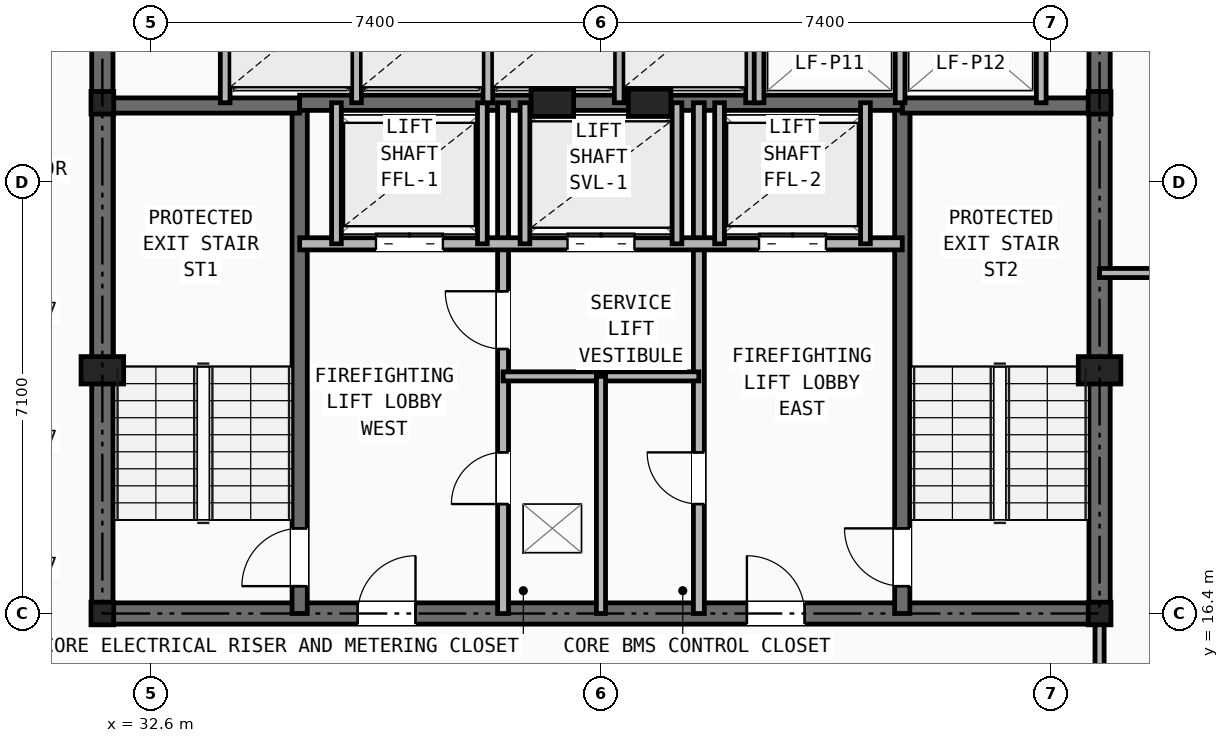
"""IFC4 building model, lengths in metres.
Left out: names, types, materials, properties, quantities, classifications, styles, units other than length and angle.
Written with IfcOpenShell. Run it as: python <this file> out.ifc"""

import sys

from ifc_helpers import new_model, si_unit, direction, frame, frame_2d, origin, origin_2d, place, context, subcontext, project, spatial, rectangle, i_section, extrude, element, fill, save


model = new_model("IFC4")
c1 = context("Model", 3, precision=1e-05, world=origin(), true_north=direction((0.0, 1.0)))
c2 = subcontext(c1, "Body", "Model", "MODEL_VIEW")
j1 = project(units=[si_unit("LENGTHUNIT", "METRE"), si_unit("PLANEANGLEUNIT", "RADIAN")], contexts=[c1])
p1 = place(None, origin())
s1 = spatial("IfcSite", under=j1, at=p1, CompositionType="ELEMENT")
p2 = place(p1, origin())
s2 = spatial("IfcBuilding", under=s1, at=p2, CompositionType="ELEMENT")
p3 = place(p2, frame((0.0, 0.0, 122.9)))
s3 = spatial("IfcBuildingStorey", under=s2, at=p3, CompositionType="ELEMENT", Elevation=122.9)
for number, where, z_axis, x_axis in (
    (1, (31.8, 16.4, 0.0), (0.0, 0.0, 1.0), (1.0, 0.0, 0.0)),
    (2, (48.2, 16.4, 0.0), (0.0, 0.0, 1.0), (1.0, 0.0, 0.0)),
    (3, (31.8, 24.8, 0.0), (0.0, 0.0, 1.0), (1.0, 0.0, 0.0)),
    (4, (48.2, 24.8, 0.0), (0.0, 0.0, 1.0), (1.0, 0.0, 0.0)),
):
    element("IfcColumn", number, at=place(p3, frame(where, z_axis=z_axis, x_axis=x_axis)), inside=s3, PredefinedType="COLUMN", context=c2, shape_type="SweptSolid", body=[
        extrude(i_section(OverallWidth=0.374, OverallDepth=0.372, WebThickness=0.016, FlangeThickness=0.026, at=origin_2d()), origin(), (0.0, 0.0, 1.0), 3.45),
    ])
for number, where, z_axis, x_axis in (
    (5, (31.8, 20.4, 0.0), (0.0, 0.0, 1.0), (1.0, 0.0, 0.0)),
    (6, (48.2, 20.4, 0.0), (0.0, 0.0, 1.0), (1.0, 0.0, 0.0)),
    (7, (39.2, 24.8, 0.0), (0.0, 0.0, 1.0), (1.0, 0.0, 0.0)),
    (8, (40.8, 24.8, 0.0), (0.0, 0.0, 1.0), (1.0, 0.0, 0.0)),
):
    element("IfcColumn", number, at=place(p3, frame(where, z_axis=z_axis, x_axis=x_axis)), inside=s3, PredefinedType="PILASTER", context=c2, shape_type="SweptSolid", body=[
        extrude(rectangle(XDim=0.7, YDim=0.45, at=origin_2d()), origin(), (0.0, 0.0, 1.0), 3.45),
    ])
p4 = place(p3, frame((31.8, 16.4, 0.0), z_axis=(0.0, 0.0, 1.0), x_axis=(1.0, 0.0, 0.0)))
e9 = element("IfcWall", 9, at=p4, inside=s3, PredefinedType="SHEAR", context=c2, shape_type="SweptSolid", body=[
    extrude(rectangle(XDim=16.4, YDim=0.35, at=frame_2d((8.2, 0.0))), origin(), (0.0, 0.0, 1.0), 3.21),
])
p5 = place(p4, frame((4.2, 0.0, 0.0)))
e10 = element("IfcOpeningElement", 10, at=p5, cuts=e9, PredefinedType="OPENING", context=c2, shape_type="SweptSolid", body=[
    extrude(rectangle(XDim=0.95, YDim=2.1, at=frame_2d((0.475, 1.05))), frame((0.0, 0.185, 0.0), z_axis=(0.0, -1.0, 0.0), x_axis=(1.0, 0.0, 0.0)), (0.0, 0.0, 1.0), 0.37),
])
p6 = place(p4, frame((10.6, 0.0, 0.0)))
e11 = element("IfcOpeningElement", 11, at=p6, cuts=e9, PredefinedType="OPENING", context=c2, shape_type="SweptSolid", body=[
    extrude(rectangle(XDim=0.95, YDim=2.1, at=frame_2d((0.475, 1.05))), frame((0.0, 0.185, 0.0), z_axis=(0.0, -1.0, 0.0), x_axis=(1.0, 0.0, 0.0)), (0.0, 0.0, 1.0), 0.37),
])
p7 = place(p3, frame((31.8, 16.4, 0.0), z_axis=(0.0, 0.0, 1.0), x_axis=(0.0, 1.0, 0.0)))
e12 = element("IfcWall", 12, at=p7, inside=s3, PredefinedType="SHEAR", context=c2, shape_type="SweptSolid", body=[
    extrude(rectangle(XDim=14.8, YDim=0.35, at=frame_2d((7.4, 0.0))), origin(), (0.0, 0.0, 1.0), 3.21),
])
p8 = place(p7, frame((11.0, 0.0, 0.0)))
e13 = element("IfcOpeningElement", 13, at=p8, cuts=e12, PredefinedType="OPENING", context=c2, shape_type="SweptSolid", body=[
    extrude(rectangle(XDim=1.1, YDim=2.15, at=frame_2d((0.55, 1.075))), frame((0.0, 0.185, 0.0), z_axis=(0.0, -1.0, 0.0), x_axis=(1.0, 0.0, 0.0)), (0.0, 0.0, 1.0), 0.37),
])
p9 = place(p3, frame((48.2, 16.4, 0.0), z_axis=(0.0, 0.0, 1.0), x_axis=(0.0, 1.0, 0.0)))
e14 = element("IfcWall", 14, at=p9, inside=s3, PredefinedType="SHEAR", context=c2, shape_type="SweptSolid", body=[
    extrude(rectangle(XDim=14.8, YDim=0.35, at=frame_2d((7.4, 0.0))), origin(), (0.0, 0.0, 1.0), 3.21),
])
p10 = place(p9, frame((11.0, 0.0, 0.0)))
e15 = element("IfcOpeningElement", 15, at=p10, cuts=e14, PredefinedType="OPENING", context=c2, shape_type="SweptSolid", body=[
    extrude(rectangle(XDim=1.1, YDim=2.15, at=frame_2d((0.55, 1.075))), frame((0.0, 0.185, 0.0), z_axis=(0.0, -1.0, 0.0), x_axis=(1.0, 0.0, 0.0)), (0.0, 0.0, 1.0), 0.37),
])
p11 = place(p3, frame((35.045, 16.4, 0.0), z_axis=(0.0, 0.0, 1.0), x_axis=(0.0, 1.0, 0.0)))
e16 = element("IfcWall", 16, at=p11, inside=s3, PredefinedType="SHEAR", context=c2, shape_type="SweptSolid", body=[
    extrude(rectangle(XDim=8.4, YDim=0.25, at=frame_2d((4.2, 0.0))), origin(), (0.0, 0.0, 1.0), 3.21),
])
p12 = place(p11, frame((0.45, 0.0, 0.0)))
e17 = element("IfcOpeningElement", 17, at=p12, cuts=e16, PredefinedType="OPENING", context=c2, shape_type="SweptSolid", body=[
    extrude(rectangle(XDim=0.95, YDim=2.1, at=frame_2d((0.475, 1.05))), frame((0.0, 0.135, 0.0), z_axis=(0.0, -1.0, 0.0), x_axis=(1.0, 0.0, 0.0)), (0.0, 0.0, 1.0), 0.27),
])
p13 = place(p3, frame((31.8, 24.755, 0.0), z_axis=(0.0, 0.0, 1.0), x_axis=(1.0, 0.0, 0.0)))
e18 = element("IfcWall", 18, at=p13, inside=s3, PredefinedType="SHEAR", context=c2, shape_type="SweptSolid", body=[
    extrude(rectangle(XDim=3.245, YDim=0.25, at=frame_2d((1.623, 0.0))), origin(), (0.0, 0.0, 1.0), 3.21),
])
p14 = place(p3, frame((44.955, 16.4, 0.0), z_axis=(0.0, 0.0, 1.0), x_axis=(0.0, 1.0, 0.0)))
e19 = element("IfcWall", 19, at=p14, inside=s3, PredefinedType="SHEAR", context=c2, shape_type="SweptSolid", body=[
    extrude(rectangle(XDim=8.4, YDim=0.25, at=frame_2d((4.2, 0.0))), origin(), (0.0, 0.0, 1.0), 3.21),
])
p15 = place(p14, frame((0.45, 0.0, 0.0)))
e20 = element("IfcOpeningElement", 20, at=p15, cuts=e19, PredefinedType="OPENING", context=c2, shape_type="SweptSolid", body=[
    extrude(rectangle(XDim=0.95, YDim=2.1, at=frame_2d((0.475, 1.05))), frame((0.0, 0.135, 0.0), z_axis=(0.0, -1.0, 0.0), x_axis=(1.0, 0.0, 0.0)), (0.0, 0.0, 1.0), 0.27),
])
p16 = place(p3, frame((44.955, 24.755, 0.0), z_axis=(0.0, 0.0, 1.0), x_axis=(1.0, 0.0, 0.0)))
e21 = element("IfcWall", 21, at=p16, inside=s3, PredefinedType="SHEAR", context=c2, shape_type="SweptSolid", body=[
    extrude(rectangle(XDim=3.245, YDim=0.25, at=frame_2d((1.623, 0.0))), origin(), (0.0, 0.0, 1.0), 3.21),
])
p17 = place(p3, frame((35.045, 24.8, 0.0), z_axis=(0.0, 0.0, 1.0), x_axis=(1.0, 0.0, 0.0)))
e22 = element("IfcWall", 22, at=p17, inside=s3, PredefinedType="SHEAR", context=c2, shape_type="SweptSolid", body=[
    extrude(rectangle(XDim=9.91, YDim=0.25, at=frame_2d((4.955, 0.0))), origin(), (0.0, 0.0, 1.0), 3.21),
])
p18 = place(p3, frame((38.39, 16.4, 0.0), z_axis=(0.0, 0.0, 1.0), x_axis=(0.0, 1.0, 0.0)))
e23 = element("IfcWall", 23, at=p18, inside=s3, PredefinedType="PARTITIONING", context=c2, shape_type="SweptSolid", body=[
    extrude(rectangle(XDim=8.4, YDim=0.18, at=frame_2d((4.2, 0.0))), origin(), (0.0, 0.0, 1.0), 2.938),
])
p19 = place(p18, frame((1.8, 0.0, 0.0)))
e24 = element("IfcOpeningElement", 24, at=p19, cuts=e23, PredefinedType="OPENING", context=c2, shape_type="SweptSolid", body=[
    extrude(rectangle(XDim=0.85, YDim=2.05, at=frame_2d((0.425, 1.025))), frame((0.0, 0.1, 0.0), z_axis=(0.0, -1.0, 0.0), x_axis=(1.0, 0.0, 0.0)), (0.0, 0.0, 1.0), 0.2),
])
p20 = place(p18, frame((4.35, 0.0, 0.0)))
e25 = element("IfcOpeningElement", 25, at=p20, cuts=e23, PredefinedType="OPENING", context=c2, shape_type="SweptSolid", body=[
    extrude(rectangle(XDim=0.95, YDim=2.1, at=frame_2d((0.475, 1.05))), frame((0.0, 0.1, 0.0), z_axis=(0.0, -1.0, 0.0), x_axis=(1.0, 0.0, 0.0)), (0.0, 0.0, 1.0), 0.2),
])
p21 = place(p3, frame((41.61, 16.4, 0.0), z_axis=(0.0, 0.0, 1.0), x_axis=(0.0, 1.0, 0.0)))
e26 = element("IfcWall", 26, at=p21, inside=s3, PredefinedType="PARTITIONING", context=c2, shape_type="SweptSolid", body=[
    extrude(rectangle(XDim=8.4, YDim=0.18, at=frame_2d((4.2, 0.0))), origin(), (0.0, 0.0, 1.0), 2.938),
])
p22 = place(p21, frame((1.8, 0.0, 0.0)))
e27 = element("IfcOpeningElement", 27, at=p22, cuts=e26, PredefinedType="OPENING", context=c2, shape_type="SweptSolid", body=[
    extrude(rectangle(XDim=0.85, YDim=2.05, at=frame_2d((0.425, 1.025))), frame((0.0, 0.1, 0.0), z_axis=(0.0, -1.0, 0.0), x_axis=(1.0, 0.0, 0.0)), (0.0, 0.0, 1.0), 0.2),
])
p23 = place(p3, frame((35.045, 22.48, 0.0), z_axis=(0.0, 0.0, 1.0), x_axis=(1.0, 0.0, 0.0)))
e28 = element("IfcWall", 28, at=p23, inside=s3, PredefinedType="SOLIDWALL", context=c2, shape_type="SweptSolid", body=[
    extrude(rectangle(XDim=9.91, YDim=0.2, at=frame_2d((4.955, 0.0))), origin(), (0.0, 0.0, 1.0), 3.21),
])
p24 = place(p23, frame((1.255, 0.0, 0.0)))
e29 = element("IfcOpeningElement", 29, at=p24, cuts=e28, PredefinedType="OPENING", context=c2, shape_type="SweptSolid", body=[
    extrude(rectangle(XDim=1.1, YDim=2.15, at=frame_2d((0.55, 1.075))), frame((0.0, 0.11, 0.0), z_axis=(0.0, -1.0, 0.0), x_axis=(1.0, 0.0, 0.0)), (0.0, 0.0, 1.0), 0.22),
])
p25 = place(p23, frame((7.555, 0.0, 0.0)))
e30 = element("IfcOpeningElement", 30, at=p25, cuts=e28, PredefinedType="OPENING", context=c2, shape_type="SweptSolid", body=[
    extrude(rectangle(XDim=1.1, YDim=2.15, at=frame_2d((0.55, 1.075))), frame((0.0, 0.11, 0.0), z_axis=(0.0, -1.0, 0.0), x_axis=(1.0, 0.0, 0.0)), (0.0, 0.0, 1.0), 0.22),
])
p26 = place(p23, frame((4.405, 0.0, 0.0)))
e31 = element("IfcOpeningElement", 31, at=p26, cuts=e28, PredefinedType="OPENING", context=c2, shape_type="SweptSolid", body=[
    extrude(rectangle(XDim=1.1, YDim=2.15, at=frame_2d((0.55, 1.075))), frame((0.0, 0.11, 0.0), z_axis=(0.0, -1.0, 0.0), x_axis=(1.0, 0.0, 0.0)), (0.0, 0.0, 1.0), 0.22),
])
p27 = place(p3, frame((38.39, 20.3, 0.0), z_axis=(0.0, 0.0, 1.0), x_axis=(1.0, 0.0, 0.0)))
e32 = element("IfcWall", 32, at=p27, inside=s3, PredefinedType="PARTITIONING", context=c2, shape_type="SweptSolid", body=[
    extrude(rectangle(XDim=3.22, YDim=0.15, at=frame_2d((1.61, 0.0))), origin(), (0.0, 0.0, 1.0), 3.21),
])
p28 = place(p3, frame((40.0, 16.4, 0.0), z_axis=(0.0, 0.0, 1.0), x_axis=(0.0, 1.0, 0.0)))
e33 = element("IfcWall", 33, at=p28, inside=s3, PredefinedType="PARTITIONING", context=c2, shape_type="SweptSolid", body=[
    extrude(rectangle(XDim=3.9, YDim=0.15, at=frame_2d((1.95, 0.0))), origin(), (0.0, 0.0, 1.0), 2.938),
])
for number, where, z_axis, x_axis in (
    (34, (35.65, 22.48, 0.0), (0.0, 0.0, 1.0), (0.0, 1.0, 0.0)),
    (35, (38.05, 22.48, 0.0), (0.0, 0.0, 1.0), (0.0, 1.0, 0.0)),
    (36, (41.95, 22.48, 0.0), (0.0, 0.0, 1.0), (0.0, 1.0, 0.0)),
    (37, (44.35, 22.48, 0.0), (0.0, 0.0, 1.0), (0.0, 1.0, 0.0)),
    (38, (38.75, 22.48, 0.0), (0.0, 0.0, 1.0), (0.0, 1.0, 0.0)),
    (39, (41.25, 22.48, 0.0), (0.0, 0.0, 1.0), (0.0, 1.0, 0.0)),
):
    element("IfcWall", number, at=place(p3, frame(where, z_axis=z_axis, x_axis=x_axis)), inside=s3, PredefinedType="SOLIDWALL", context=c2, shape_type="SweptSolid", body=[
        extrude(rectangle(XDim=2.32, YDim=0.16, at=frame_2d((1.16, 0.0))), origin(), (0.0, 0.0, 1.0), 3.21),
    ])
for number, where, z_axis, x_axis in (
    (40, (33.82, 24.8, 0.0), (0.0, 0.0, 1.0), (0.0, 1.0, 0.0)),
    (41, (35.98, 24.8, 0.0), (0.0, 0.0, 1.0), (0.0, 1.0, 0.0)),
    (42, (38.14, 24.8, 0.0), (0.0, 0.0, 1.0), (0.0, 1.0, 0.0)),
    (43, (40.3, 24.8, 0.0), (0.0, 0.0, 1.0), (0.0, 1.0, 0.0)),
    (44, (42.46, 24.8, 0.0), (0.0, 0.0, 1.0), (0.0, 1.0, 0.0)),
    (45, (42.6, 24.8, 0.0), (0.0, 0.0, 1.0), (0.0, 1.0, 0.0)),
    (46, (44.92, 24.8, 0.0), (0.0, 0.0, 1.0), (0.0, 1.0, 0.0)),
    (47, (47.24, 24.8, 0.0), (0.0, 0.0, 1.0), (0.0, 1.0, 0.0)),
):
    element("IfcWall", number, at=place(p3, frame(where, z_axis=z_axis, x_axis=x_axis)), inside=s3, PredefinedType="SOLIDWALL", context=c2, shape_type="SweptSolid", body=[
        extrude(rectangle(XDim=2.08, YDim=0.16, at=frame_2d((1.04, 0.0))), origin(), (0.0, 0.0, 1.0), 3.21),
    ])
p29 = place(p3, frame((48.2, 14.1, 0.0), z_axis=(0.0, 0.0, 1.0), x_axis=(0.0, 1.0, 0.0)))
e48 = element("IfcWall", 48, at=p29, inside=s3, PredefinedType="PARTITIONING", context=c2, shape_type="SweptSolid", body=[
    extrude(rectangle(XDim=2.3, YDim=0.15, at=frame_2d((1.15, 0.0))), origin(), (0.0, 0.0, 1.0), 2.661),
])
p30 = place(p3, frame((48.2, 22.0, 0.0), z_axis=(0.0, 0.0, 1.0), x_axis=(1.0, 0.0, 0.0)))
e49 = element("IfcWall", 49, at=p30, inside=s3, PredefinedType="PARTITIONING", context=c2, shape_type="SweptSolid", body=[
    extrude(rectangle(XDim=14.262, YDim=0.15, at=frame_2d((7.131, 0.0))), origin(), (0.0, 0.0, 1.0), 2.589),
])
p31 = place(p30, frame((1.4, 0.0, 0.0)))
e50 = element("IfcOpeningElement", 50, at=p31, cuts=e49, PredefinedType="OPENING", context=c2, shape_type="SweptSolid", body=[
    extrude(rectangle(XDim=0.95, YDim=2.1, at=frame_2d((0.475, 1.05))), frame((0.0, 0.085, 0.0), z_axis=(0.0, -1.0, 0.0), x_axis=(1.0, 0.0, 0.0)), (0.0, 0.0, 1.0), 0.17),
])
p32 = place(p19, origin())
e51 = element("IfcDoor", 51, at=p32, inside=s3, OperationType="SINGLE_SWING_LEFT", PredefinedType="DOOR", context=c2, shape_type="SweptSolid", body=[
    extrude(rectangle(XDim=0.85, YDim=2.05, at=frame_2d((0.425, 1.025))), frame((0.0, 0.025, 0.0), z_axis=(0.0, -1.0, 0.0), x_axis=(1.0, 0.0, 0.0)), (0.0, 0.0, 1.0), 0.05),
])
fill(e24, e51)
p33 = place(p22, origin())
e52 = element("IfcDoor", 52, at=p33, inside=s3, OperationType="SINGLE_SWING_RIGHT", PredefinedType="DOOR", context=c2, shape_type="SweptSolid", body=[
    extrude(rectangle(XDim=0.85, YDim=2.05, at=frame_2d((0.425, 1.025))), frame((0.0, 0.025, 0.0), z_axis=(0.0, -1.0, 0.0), x_axis=(1.0, 0.0, 0.0)), (0.0, 0.0, 1.0), 0.05),
])
fill(e27, e52)
p34 = place(p20, origin())
e53 = element("IfcDoor", 53, at=p34, inside=s3, OperationType="SINGLE_SWING_RIGHT", PredefinedType="DOOR", context=c2, shape_type="SweptSolid", body=[
    extrude(rectangle(XDim=0.95, YDim=2.1, at=frame_2d((0.475, 1.05))), frame((0.0, 0.025, 0.0), z_axis=(0.0, -1.0, 0.0), x_axis=(1.0, 0.0, 0.0)), (0.0, 0.0, 1.0), 0.05),
])
fill(e25, e53)
p35 = place(p12, origin())
e54 = element("IfcDoor", 54, at=p35, inside=s3, OperationType="SINGLE_SWING_LEFT", PredefinedType="DOOR", context=c2, shape_type="SweptSolid", body=[
    extrude(rectangle(XDim=0.95, YDim=2.1, at=frame_2d((0.475, 1.05))), frame((0.0, 0.025, 0.0), z_axis=(0.0, -1.0, 0.0), x_axis=(1.0, 0.0, 0.0)), (0.0, 0.0, 1.0), 0.05),
])
fill(e17, e54)
p36 = place(p15, origin())
e55 = element("IfcDoor", 55, at=p36, inside=s3, OperationType="SINGLE_SWING_RIGHT", PredefinedType="DOOR", context=c2, shape_type="SweptSolid", body=[
    extrude(rectangle(XDim=0.95, YDim=2.1, at=frame_2d((0.475, 1.05))), frame((0.0, 0.025, 0.0), z_axis=(0.0, -1.0, 0.0), x_axis=(1.0, 0.0, 0.0)), (0.0, 0.0, 1.0), 0.05),
])
fill(e20, e55)
p37 = place(p5, origin())
e56 = element("IfcDoor", 56, at=p37, inside=s3, OperationType="SINGLE_SWING_RIGHT", PredefinedType="DOOR", context=c2, shape_type="SweptSolid", body=[
    extrude(rectangle(XDim=0.95, YDim=2.1, at=frame_2d((0.475, 1.05))), frame((0.0, 0.025, 0.0), z_axis=(0.0, -1.0, 0.0), x_axis=(1.0, 0.0, 0.0)), (0.0, 0.0, 1.0), 0.05),
])
fill(e10, e56)
p38 = place(p6, origin())
e57 = element("IfcDoor", 57, at=p38, inside=s3, OperationType="SINGLE_SWING_LEFT", PredefinedType="DOOR", context=c2, shape_type="SweptSolid", body=[
    extrude(rectangle(XDim=0.95, YDim=2.1, at=frame_2d((0.475, 1.05))), frame((0.0, 0.025, 0.0), z_axis=(0.0, -1.0, 0.0), x_axis=(1.0, 0.0, 0.0)), (0.0, 0.0, 1.0), 0.05),
])
fill(e11, e57)
p39 = place(p24, origin())
e58 = element("IfcDoor", 58, at=p39, inside=s3, OperationType="DOUBLE_DOOR_SLIDING", PredefinedType="DOOR", context=c2, shape_type="SweptSolid", body=[
    extrude(rectangle(XDim=1.1, YDim=2.15, at=frame_2d((0.55, 1.075))), frame((0.0, 0.025, 0.0), z_axis=(0.0, -1.0, 0.0), x_axis=(1.0, 0.0, 0.0)), (0.0, 0.0, 1.0), 0.05),
])
fill(e29, e58)
p40 = place(p25, origin())
e59 = element("IfcDoor", 59, at=p40, inside=s3, OperationType="DOUBLE_DOOR_SLIDING", PredefinedType="DOOR", context=c2, shape_type="SweptSolid", body=[
    extrude(rectangle(XDim=1.1, YDim=2.15, at=frame_2d((0.55, 1.075))), frame((0.0, 0.025, 0.0), z_axis=(0.0, -1.0, 0.0), x_axis=(1.0, 0.0, 0.0)), (0.0, 0.0, 1.0), 0.05),
])
fill(e30, e59)
p41 = place(p26, origin())
e60 = element("IfcDoor", 60, at=p41, inside=s3, OperationType="DOUBLE_DOOR_SLIDING", PredefinedType="DOOR", context=c2, shape_type="SweptSolid", body=[
    extrude(rectangle(XDim=1.1, YDim=2.15, at=frame_2d((0.55, 1.075))), frame((0.0, 0.025, 0.0), z_axis=(0.0, -1.0, 0.0), x_axis=(1.0, 0.0, 0.0)), (0.0, 0.0, 1.0), 0.05),
])
fill(e31, e60)
save(model, sys.argv[1])
